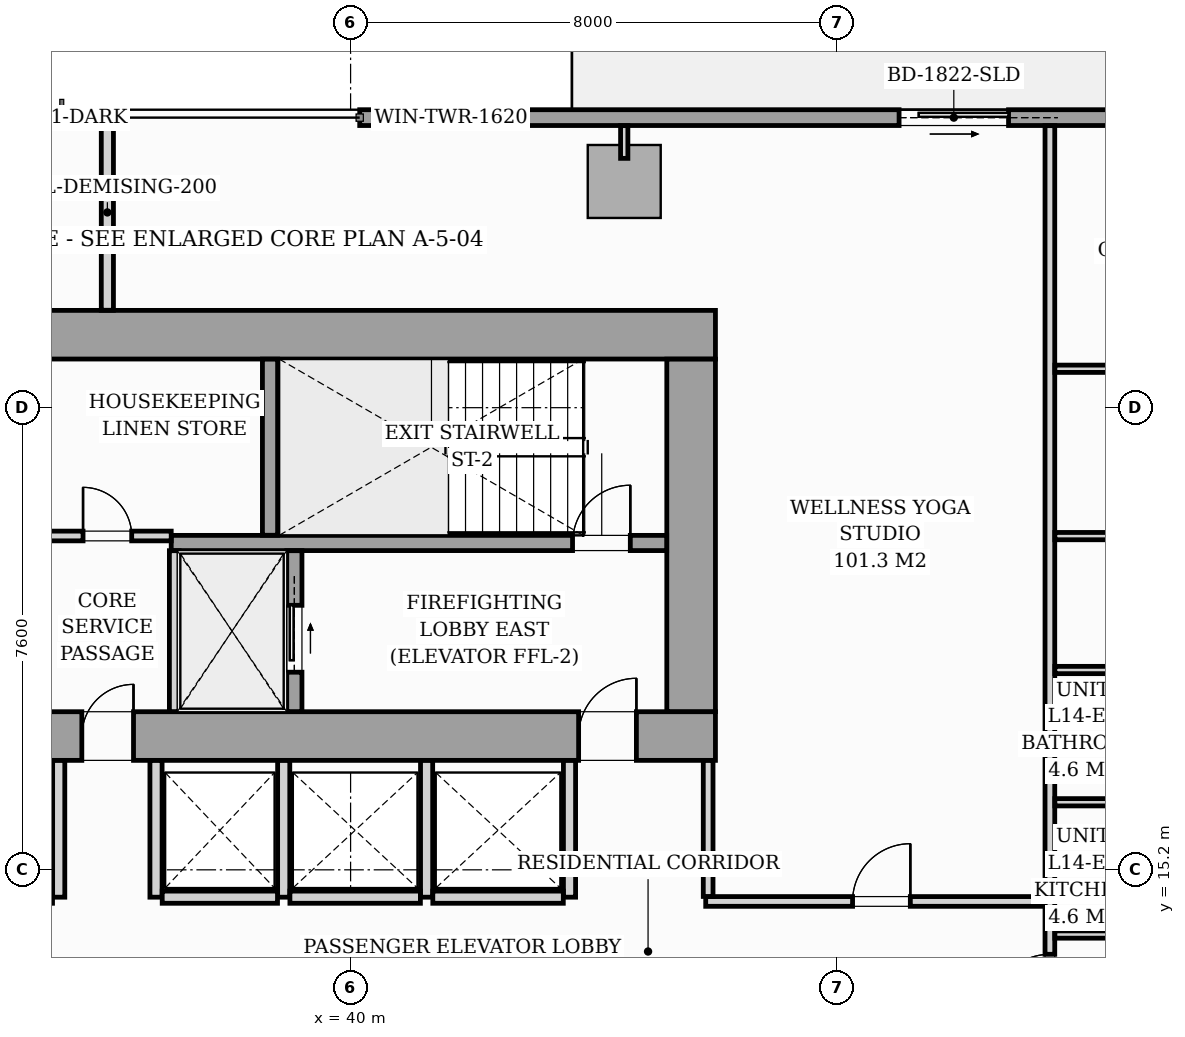
"""IFC4 building model, lengths in metres.
Left out: names, types, materials, properties, quantities, classifications, styles, units other than length and angle.
Written with IfcOpenShell. Run it as: python <this file> out.ifc"""

import sys

from ifc_helpers import new_model, si_unit, direction, frame, frame_2d, origin, origin_2d, place, context, subcontext, project, spatial, rectangle, i_section, extrude, source, transform, mapped, element, fill, save


model = new_model("IFC4")
c1 = context("Model", 3, precision=1e-05, world=origin(), true_north=direction((0.0, 1.0)))
c2 = subcontext(c1, "Body", "Model", "MODEL_VIEW")
j1 = project(units=[si_unit("LENGTHUNIT", "METRE"), si_unit("PLANEANGLEUNIT", "RADIAN")], contexts=[c1])
p1 = place(None, origin())
s1 = spatial("IfcSite", under=j1, at=p1, CompositionType="ELEMENT")
p2 = place(p1, origin())
s2 = spatial("IfcBuilding", under=s1, at=p2, CompositionType="ELEMENT")
p3 = place(p2, frame((0.0, 0.0, 51.8)))
s3 = spatial("IfcBuildingStorey", under=s2, at=p3, CompositionType="ELEMENT", Elevation=51.8)
m1 = source(origin(), c2, "Body", "SweptSolid", [
    extrude(i_section(OverallWidth=0.437, OverallDepth=0.514, WebThickness=0.061, FlangeThickness=0.097, FilletRadius=0.018, at=origin_2d()), origin(), (0.0, 0.0, 1.0), 3.196),
])
for number, where, z_axis, x_axis in (
    (1, (38.88, 17.4, 0.002), (0.0, 0.0, 1.0), (1.0, 0.0, 0.0)),
    (2, (45.6, 17.4, 0.002), (0.0, 0.0, 1.0), (1.0, 0.0, 0.0)),
    (3, (38.88, 24.0, 0.002), (0.0, 0.0, 1.0), (1.0, 0.0, 0.0)),
    (4, (45.6, 24.0, 0.002), (0.0, 0.0, 1.0), (1.0, 0.0, 0.0)),
):
    element("IfcColumn", number, at=place(p3, frame(where, z_axis=z_axis, x_axis=x_axis)), inside=s3, PredefinedType="PILASTER", context=c2, shape_type="MappedRepresentation", body=[
        mapped(m1, transform((0.0, 0.0, 0.0), scale=1.0)),
    ])
m2 = source(origin(), c2, "Body", "SweptSolid", [
    extrude(rectangle(XDim=1.2, YDim=1.2, at=origin_2d()), origin(), (0.0, 0.0, 1.0), 3.196),
])
p4 = place(p3, frame((44.5, 26.52, 0.002), z_axis=(0.0, 0.0, 1.0), x_axis=(1.0, 0.0, 0.0)))
e5 = element("IfcColumn", 5, at=p4, inside=s3, PredefinedType="COLUMN", context=c2, shape_type="MappedRepresentation", body=[
    mapped(m2, transform((0.0, 0.0, 0.0), scale=1.0)),
])
p5 = place(p3, frame((40.15, 27.57, 0.0), z_axis=(0.0, 0.0, 1.0), x_axis=(1.0, 0.0, 0.0)))
e6 = element("IfcWall", 6, at=p5, inside=s3, PredefinedType="STANDARD", context=c2, shape_type="SweptSolid", body=[
    extrude(rectangle(XDim=17.15, YDim=0.26, at=frame_2d((8.575, 0.0))), origin(), (0.0, 0.0, 1.0), 2.94),
])
p6 = place(p5, frame((8.87, 0.0, 0.0)))
e7 = element("IfcOpeningElement", 7, at=p6, cuts=e6, PredefinedType="OPENING", context=c2, shape_type="SweptSolid", body=[
    extrude(rectangle(XDim=1.8, YDim=2.06, at=frame_2d((0.9, 1.03))), frame((0.0, 0.14, 0.0), z_axis=(0.0, -1.0, 0.0), x_axis=(1.0, 0.0, 0.0)), (0.0, 0.0, 1.0), 0.28),
])
p7 = place(p5, frame((0.7, 0.0, 0.65)))
e8 = element("IfcOpeningElement", 8, at=p7, cuts=e6, PredefinedType="OPENING", context=c2, shape_type="SweptSolid", body=[
    extrude(rectangle(XDim=1.6, YDim=1.5, at=frame_2d((0.8, 0.75))), frame((0.0, 0.14, 0.0), z_axis=(0.0, -1.0, 0.0), x_axis=(1.0, 0.0, 0.0)), (0.0, 0.0, 1.0), 0.28),
])
p8 = place(p3, frame((26.0, 17.4, 0.0), z_axis=(0.0, 0.0, 1.0), x_axis=(1.0, 0.0, 0.0)))
e9 = element("IfcWall", 9, at=p8, inside=s3, PredefinedType="SHEAR", context=c2, shape_type="SweptSolid", body=[
    extrude(rectangle(XDim=20.0, YDim=0.8, at=frame_2d((10.0, 0.0))), origin(), (0.0, 0.0, 1.0), 3.2),
])
p9 = place(p8, frame((1.15, 0.0, 0.0)))
e10 = element("IfcOpeningElement", 10, at=p9, cuts=e9, PredefinedType="OPENING", context=c2, shape_type="SweptSolid", body=[
    extrude(rectangle(XDim=0.95, YDim=2.06, at=frame_2d((0.475, 1.03))), frame((0.0, 0.41, 0.0), z_axis=(0.0, -1.0, 0.0), x_axis=(1.0, 0.0, 0.0)), (0.0, 0.0, 1.0), 0.82),
])
p10 = place(p8, frame((9.58, 0.0, 0.0)))
e11 = element("IfcOpeningElement", 11, at=p10, cuts=e9, PredefinedType="OPENING", context=c2, shape_type="SweptSolid", body=[
    extrude(rectangle(XDim=0.85, YDim=2.0, at=frame_2d((0.425, 1.0))), frame((0.0, 0.41, 0.0), z_axis=(0.0, -1.0, 0.0), x_axis=(1.0, 0.0, 0.0)), (0.0, 0.0, 1.0), 0.82),
])
p11 = place(p8, frame((17.75, 0.0, 0.0)))
e12 = element("IfcOpeningElement", 12, at=p11, cuts=e9, PredefinedType="OPENING", context=c2, shape_type="SweptSolid", body=[
    extrude(rectangle(XDim=0.95, YDim=2.06, at=frame_2d((0.475, 1.03))), frame((0.0, 0.41, 0.0), z_axis=(0.0, -1.0, 0.0), x_axis=(1.0, 0.0, 0.0)), (0.0, 0.0, 1.0), 0.82),
])
p12 = place(p3, frame((26.0, 24.0, 0.0), z_axis=(0.0, 0.0, 1.0), x_axis=(1.0, 0.0, 0.0)))
e13 = element("IfcWall", 13, at=p12, inside=s3, PredefinedType="SHEAR", context=c2, shape_type="SweptSolid", body=[
    extrude(rectangle(XDim=20.0, YDim=0.8, at=frame_2d((10.0, 0.0))), origin(), (0.0, 0.0, 1.0), 3.2),
])
p13 = place(p3, frame((45.6, 17.802, 0.0), z_axis=(0.0, 0.0, 1.0), x_axis=(0.0, 1.0, 0.0)))
e14 = element("IfcWall", 14, at=p13, inside=s3, PredefinedType="SHEAR", context=c2, shape_type="SweptSolid", body=[
    extrude(rectangle(XDim=5.796, YDim=0.8, at=frame_2d((2.898, 0.0))), origin(), (0.0, 0.0, 1.0), 3.2),
])
p14 = place(p3, frame((37.05, 20.575, 0.0), z_axis=(0.0, 0.0, 1.0), x_axis=(1.0, 0.0, 0.0)))
e15 = element("IfcWall", 15, at=p14, inside=s3, PredefinedType="SOLIDWALL", context=c2, shape_type="SweptSolid", body=[
    extrude(rectangle(XDim=8.148, YDim=0.25, at=frame_2d((4.074, 0.0))), origin(), (0.0, 0.0, 1.0), 3.2),
])
p15 = place(p14, frame((6.6, 0.0, 0.0)))
e16 = element("IfcOpeningElement", 16, at=p15, cuts=e15, PredefinedType="OPENING", context=c2, shape_type="SweptSolid", body=[
    extrude(rectangle(XDim=0.95, YDim=2.06, at=frame_2d((0.475, 1.03))), frame((0.0, 0.135, 0.0), z_axis=(0.0, -1.0, 0.0), x_axis=(1.0, 0.0, 0.0)), (0.0, 0.0, 1.0), 0.27),
])
p16 = place(p3, frame((38.675, 20.702, 0.0), z_axis=(0.0, 0.0, 1.0), x_axis=(0.0, 1.0, 0.0)))
e17 = element("IfcWall", 17, at=p16, inside=s3, PredefinedType="SOLIDWALL", context=c2, shape_type="SweptSolid", body=[
    extrude(rectangle(XDim=2.896, YDim=0.25, at=frame_2d((1.448, 0.0))), origin(), (0.0, 0.0, 1.0), 3.2),
])
p17 = place(p3, frame((37.1, 17.802, 0.0), z_axis=(0.0, 0.0, 1.0), x_axis=(0.0, 1.0, 0.0)))
e18 = element("IfcWall", 18, at=p17, inside=s3, PredefinedType="PARTITIONING", context=c2, shape_type="SweptSolid", body=[
    extrude(rectangle(XDim=2.646, YDim=0.16, at=frame_2d((1.323, 0.0))), origin(), (0.0, 0.0, 1.0), 2.94),
])
p18 = place(p3, frame((39.075, 17.802, 0.0), z_axis=(0.0, 0.0, 1.0), x_axis=(0.0, 1.0, 0.0)))
e19 = element("IfcWall", 19, at=p18, inside=s3, PredefinedType="SOLIDWALL", context=c2, shape_type="SweptSolid", body=[
    extrude(rectangle(XDim=2.646, YDim=0.25, at=frame_2d((1.323, 0.0))), origin(), (0.0, 0.0, 1.0), 3.2),
])
p19 = place(p18, frame((0.648, 0.0, 0.0)))
e20 = element("IfcOpeningElement", 20, at=p19, cuts=e19, PredefinedType="OPENING", context=c2, shape_type="SweptSolid", body=[
    extrude(rectangle(XDim=1.1, YDim=2.08, at=frame_2d((0.55, 1.04))), frame((0.0, 0.135, 0.0), z_axis=(0.0, -1.0, 0.0), x_axis=(1.0, 0.0, 0.0)), (0.0, 0.0, 1.0), 0.27),
])
p20 = place(p3, frame((34.95, 20.69, 0.0), z_axis=(0.0, 0.0, 1.0), x_axis=(1.0, 0.0, 0.0)))
e21 = element("IfcWall", 21, at=p20, inside=s3, PredefinedType="PARTITIONING", context=c2, shape_type="SweptSolid", body=[
    extrude(rectangle(XDim=2.1, YDim=0.16, at=frame_2d((1.05, 0.0))), origin(), (0.0, 0.0, 1.0), 2.94),
])
p21 = place(p20, frame((0.65, 0.0, 0.0)))
e22 = element("IfcOpeningElement", 22, at=p21, cuts=e21, PredefinedType="OPENING", context=c2, shape_type="SweptSolid", body=[
    extrude(rectangle(XDim=0.8, YDim=2.05, at=frame_2d((0.4, 1.025))), frame((0.0, 0.09, 0.0), z_axis=(0.0, -1.0, 0.0), x_axis=(1.0, 0.0, 0.0)), (0.0, 0.0, 1.0), 0.18),
])
for number, where, z_axis, x_axis in (
    (23, (35.2, 14.75, 0.0), (0.0, 0.0, 1.0), (0.0, 1.0, 0.0)),
    (24, (36.8, 14.75, 0.0), (0.0, 0.0, 1.0), (0.0, 1.0, 0.0)),
    (25, (38.9, 14.75, 0.0), (0.0, 0.0, 1.0), (0.0, 1.0, 0.0)),
):
    element("IfcWall", number, at=place(p3, frame(where, z_axis=z_axis, x_axis=x_axis)), inside=s3, PredefinedType="PARTITIONING", context=c2, shape_type="SweptSolid", body=[
        extrude(rectangle(XDim=2.248, YDim=0.2, at=frame_2d((1.124, 0.0))), origin(), (0.0, 0.0, 1.0), 2.94),
    ])
p22 = place(p3, frame((36.902, 14.75, 0.0), z_axis=(0.0, 0.0, 1.0), x_axis=(1.0, 0.0, 0.0)))
e26 = element("IfcWall", 26, at=p22, inside=s3, PredefinedType="PARTITIONING", context=c2, shape_type="SweptSolid", body=[
    extrude(rectangle(XDim=1.896, YDim=0.2, at=frame_2d((0.948, 0.0))), origin(), (0.0, 0.0, 1.0), 2.94),
])
for number, where, z_axis, x_axis in (
    (27, (41.25, 14.75, 0.0), (0.0, 0.0, 1.0), (0.0, 1.0, 0.0)),
    (28, (43.6, 14.75, 0.0), (0.0, 0.0, 1.0), (0.0, 1.0, 0.0)),
):
    element("IfcWall", number, at=place(p3, frame(where, z_axis=z_axis, x_axis=x_axis)), inside=s3, PredefinedType="PARTITIONING", context=c2, shape_type="SweptSolid", body=[
        extrude(rectangle(XDim=2.248, YDim=0.2, at=frame_2d((1.124, 0.0))), origin(), (0.0, 0.0, 1.0), 2.94),
    ])
for number, where, z_axis, x_axis in (
    (29, (39.002, 14.75, 0.0), (0.0, 0.0, 1.0), (1.0, 0.0, 0.0)),
    (30, (41.352, 14.75, 0.0), (0.0, 0.0, 1.0), (1.0, 0.0, 0.0)),
):
    element("IfcWall", number, at=place(p3, frame(where, z_axis=z_axis, x_axis=x_axis)), inside=s3, PredefinedType="PARTITIONING", context=c2, shape_type="SweptSolid", body=[
        extrude(rectangle(XDim=2.146, YDim=0.2, at=frame_2d((1.073, 0.0))), origin(), (0.0, 0.0, 1.0), 2.94),
    ])
p23 = place(p3, frame((51.5, 12.432, 0.0), z_axis=(0.0, 0.0, 1.0), x_axis=(0.0, 1.0, 0.0)))
e31 = element("IfcWall", 31, at=p23, inside=s3, PredefinedType="PARTITIONING", context=c2, shape_type="SweptSolid", body=[
    extrude(rectangle(XDim=15.006, YDim=0.16, at=frame_2d((7.503, 0.0))), origin(), (0.0, 0.0, 1.0), 2.94),
])
p24 = place(p23, frame((0.429, 0.0, 0.0)))
e32 = element("IfcOpeningElement", 32, at=p24, cuts=e31, PredefinedType="OPENING", context=c2, shape_type="SweptSolid", body=[
    extrude(rectangle(XDim=0.95, YDim=2.06, at=frame_2d((0.475, 1.03))), frame((0.0, 0.09, 0.0), z_axis=(0.0, -1.0, 0.0), x_axis=(1.0, 0.0, 0.0)), (0.0, 0.0, 1.0), 0.18),
])
p25 = place(p3, frame((36.0, 24.402, 0.0), z_axis=(0.0, 0.0, 1.0), x_axis=(0.0, 1.0, 0.0)))
e33 = element("IfcWall", 33, at=p25, inside=s3, PredefinedType="PARTITIONING", context=c2, shape_type="SweptSolid", body=[
    extrude(rectangle(XDim=3.218, YDim=0.2, at=frame_2d((1.609, 0.0))), origin(), (0.0, 0.0, 1.0), 2.94),
])
p26 = place(p3, frame((51.582, 16.311, 0.0), z_axis=(0.0, 0.0, 1.0), x_axis=(1.0, 0.0, 0.0)))
e34 = element("IfcWall", 34, at=p26, inside=s3, PredefinedType="PARTITIONING", context=c2, shape_type="SweptSolid", body=[
    extrude(rectangle(XDim=2.256, YDim=0.12, at=frame_2d((1.128, 0.0))), origin(), (0.0, 0.0, 1.0), 2.045),
])
for number, where, z_axis, x_axis in (
    (35, (51.582, 14.136, 0.0), (0.0, 0.0, 1.0), (1.0, 0.0, 0.0)),
    (36, (51.582, 18.486, 0.0), (0.0, 0.0, 1.0), (1.0, 0.0, 0.0)),
):
    element("IfcWall", number, at=place(p3, frame(where, z_axis=z_axis, x_axis=x_axis)), inside=s3, PredefinedType="PARTITIONING", context=c2, shape_type="SweptSolid", body=[
        extrude(rectangle(XDim=2.256, YDim=0.12, at=frame_2d((1.128, 0.0))), origin(), (0.0, 0.0, 1.0), 2.94),
    ])
p27 = place(p3, frame((51.582, 23.44, 0.0), z_axis=(0.0, 0.0, 1.0), x_axis=(1.0, 0.0, 0.0)))
e37 = element("IfcWall", 37, at=p27, inside=s3, PredefinedType="PARTITIONING", context=c2, shape_type="SweptSolid", body=[
    extrude(rectangle(XDim=8.138, YDim=0.12, at=frame_2d((4.069, 0.0))), origin(), (0.0, 0.0, 1.0), 2.94),
])
p28 = place(p27, frame((3.653, 0.0, 0.0)))
e38 = element("IfcOpeningElement", 38, at=p28, cuts=e37, PredefinedType="OPENING", context=c2, shape_type="SweptSolid", body=[
    extrude(rectangle(XDim=0.85, YDim=2.05, at=frame_2d((0.425, 1.025))), frame((0.0, 0.07, 0.0), z_axis=(0.0, -1.0, 0.0), x_axis=(1.0, 0.0, 0.0)), (0.0, 0.0, 1.0), 0.14),
])
p29 = place(p3, frame((51.582, 20.688, 0.0), z_axis=(0.0, 0.0, 1.0), x_axis=(1.0, 0.0, 0.0)))
e39 = element("IfcWall", 39, at=p29, inside=s3, PredefinedType="PARTITIONING", context=c2, shape_type="SweptSolid", body=[
    extrude(rectangle(XDim=8.138, YDim=0.12, at=frame_2d((4.069, 0.0))), origin(), (0.0, 0.0, 1.0), 2.94),
])
p30 = place(p29, frame((3.653, 0.0, 0.0)))
e40 = element("IfcOpeningElement", 40, at=p30, cuts=e39, PredefinedType="OPENING", context=c2, shape_type="SweptSolid", body=[
    extrude(rectangle(XDim=0.85, YDim=2.05, at=frame_2d((0.425, 1.025))), frame((0.0, 0.07, 0.0), z_axis=(0.0, -1.0, 0.0), x_axis=(1.0, 0.0, 0.0)), (0.0, 0.0, 1.0), 0.14),
])
p31 = place(p3, frame((45.84, 14.68, 0.0), z_axis=(0.0, 0.0, 1.0), x_axis=(1.0, 0.0, 0.0)))
e41 = element("IfcWall", 41, at=p31, inside=s3, PredefinedType="PARTITIONING", context=c2, shape_type="SweptSolid", body=[
    extrude(rectangle(XDim=5.578, YDim=0.16, at=frame_2d((2.789, 0.0))), origin(), (0.0, 0.0, 1.0), 2.94),
])
p32 = place(p31, frame((2.415, 0.0, 0.0)))
e42 = element("IfcOpeningElement", 42, at=p32, cuts=e41, PredefinedType="OPENING", context=c2, shape_type="SweptSolid", body=[
    extrude(rectangle(XDim=0.95, YDim=2.06, at=frame_2d((0.475, 1.03))), frame((0.0, 0.09, 0.0), z_axis=(0.0, -1.0, 0.0), x_axis=(1.0, 0.0, 0.0)), (0.0, 0.0, 1.0), 0.18),
])
p33 = place(p3, frame((45.88, 14.762, 0.0), z_axis=(0.0, 0.0, 1.0), x_axis=(0.0, 1.0, 0.0)))
e43 = element("IfcWall", 43, at=p33, inside=s3, PredefinedType="PARTITIONING", context=c2, shape_type="SweptSolid", body=[
    extrude(rectangle(XDim=2.236, YDim=0.16, at=frame_2d((1.118, 0.0))), origin(), (0.0, 0.0, 1.0), 2.94),
])
p34 = place(p3, frame((44.5, 26.9, 0.0), z_axis=(0.0, 0.0, 1.0), x_axis=(0.0, 1.0, 0.0)))
e44 = element("IfcWall", 44, at=p34, inside=s3, PredefinedType="PARTITIONING", context=c2, shape_type="SweptSolid", body=[
    extrude(rectangle(XDim=0.538, YDim=0.12, at=frame_2d((0.269, 0.0))), origin(), (0.0, 0.0, 1.0), 2.94),
])
m3 = source(origin(), c2, "Body", "SweptSolid", [
    extrude(rectangle(XDim=1.8, YDim=2.06, at=frame_2d((0.9, 1.03))), frame((0.0, 0.025, 0.0), z_axis=(0.0, -1.0, 0.0), x_axis=(1.0, 0.0, 0.0)), (0.0, 0.0, 1.0), 0.05),
])
p35 = place(p6, origin())
e45 = element("IfcDoor", 45, at=p35, inside=s3, OperationType="SLIDING_TO_RIGHT", PredefinedType="DOOR", context=c2, shape_type="MappedRepresentation", body=[
    mapped(m3, transform((0.0, 0.0, 0.0), scale=1.0)),
])
fill(e7, e45)
m4 = source(origin(), c2, "Body", "SweptSolid", [
    extrude(rectangle(XDim=1.6, YDim=1.5, at=frame_2d((0.8, 0.75))), frame((0.0, 0.03, 0.0), z_axis=(0.0, -1.0, 0.0), x_axis=(1.0, 0.0, 0.0)), (0.0, 0.0, 1.0), 0.06),
])
p36 = place(p7, origin())
e46 = element("IfcWindow", 46, at=p36, inside=s3, PartitioningType="SINGLE_PANEL", PredefinedType="WINDOW", context=c2, shape_type="MappedRepresentation", body=[
    mapped(m4, transform((0.0, 0.0, 0.0), scale=1.0)),
])
fill(e8, e46)
m5 = source(origin(), c2, "Body", "SweptSolid", [
    extrude(rectangle(XDim=0.85, YDim=2.0, at=frame_2d((0.425, 1.0))), frame((0.0, 0.025, 0.0), z_axis=(0.0, -1.0, 0.0), x_axis=(1.0, 0.0, 0.0)), (0.0, 0.0, 1.0), 0.05),
])
p37 = place(p10, origin())
e47 = element("IfcDoor", 47, at=p37, inside=s3, OperationType="SINGLE_SWING_RIGHT", PredefinedType="DOOR", context=c2, shape_type="MappedRepresentation", body=[
    mapped(m5, transform((0.0, 0.0, 0.0), scale=1.0)),
])
fill(e11, e47)
m6 = source(origin(), c2, "Body", "SweptSolid", [
    extrude(rectangle(XDim=0.95, YDim=2.06, at=frame_2d((0.475, 1.03))), frame((0.0, 0.025, 0.0), z_axis=(0.0, -1.0, 0.0), x_axis=(1.0, 0.0, 0.0)), (0.0, 0.0, 1.0), 0.05),
])
p38 = place(p11, origin())
e48 = element("IfcDoor", 48, at=p38, inside=s3, OperationType="SINGLE_SWING_RIGHT", PredefinedType="DOOR", context=c2, shape_type="MappedRepresentation", body=[
    mapped(m6, transform((0.0, 0.0, 0.0), scale=1.0)),
])
fill(e12, e48)
p39 = place(p15, origin())
e49 = element("IfcDoor", 49, at=p39, inside=s3, OperationType="SINGLE_SWING_RIGHT", PredefinedType="DOOR", context=c2, shape_type="MappedRepresentation", body=[
    mapped(m6, transform((0.0, 0.0, 0.0), scale=1.0)),
])
fill(e16, e49)
m7 = source(origin(), c2, "Body", "SweptSolid", [
    extrude(rectangle(XDim=1.1, YDim=2.08, at=frame_2d((0.55, 1.04))), frame((0.0, 0.025, 0.0), z_axis=(0.0, -1.0, 0.0), x_axis=(1.0, 0.0, 0.0)), (0.0, 0.0, 1.0), 0.05),
])
p40 = place(p19, origin())
e50 = element("IfcDoor", 50, at=p40, inside=s3, OperationType="SLIDING_TO_RIGHT", PredefinedType="DOOR", context=c2, shape_type="MappedRepresentation", body=[
    mapped(m7, transform((0.0, 0.0, 0.0), scale=1.0)),
])
fill(e20, e50)
m8 = source(origin(), c2, "Body", "SweptSolid", [
    extrude(rectangle(XDim=0.8, YDim=2.05, at=frame_2d((0.4, 1.025))), frame((0.0, 0.025, 0.0), z_axis=(0.0, -1.0, 0.0), x_axis=(1.0, 0.0, 0.0)), (0.0, 0.0, 1.0), 0.05),
])
p41 = place(p21, origin())
e51 = element("IfcDoor", 51, at=p41, inside=s3, OperationType="SINGLE_SWING_LEFT", PredefinedType="DOOR", context=c2, shape_type="MappedRepresentation", body=[
    mapped(m8, transform((0.0, 0.0, 0.0), scale=1.0)),
])
fill(e22, e51)
m9 = source(origin(), c2, "Body", "SweptSolid", [
    extrude(rectangle(XDim=0.95, YDim=2.06, at=frame_2d((0.475, 1.03))), frame((0.0, 0.025, 0.0), z_axis=(0.0, -1.0, 0.0), x_axis=(1.0, 0.0, 0.0)), (0.0, 0.0, 1.0), 0.05),
])
p42 = place(p24, origin())
e52 = element("IfcDoor", 52, at=p42, inside=s3, OperationType="SINGLE_SWING_LEFT", PredefinedType="DOOR", context=c2, shape_type="MappedRepresentation", body=[
    mapped(m9, transform((0.0, 0.0, 0.0), scale=1.0)),
])
fill(e32, e52)
p43 = place(p32, origin())
e53 = element("IfcDoor", 53, at=p43, inside=s3, OperationType="SINGLE_SWING_RIGHT", PredefinedType="DOOR", context=c2, shape_type="MappedRepresentation", body=[
    mapped(m9, transform((0.0, 0.0, 0.0), scale=1.0)),
])
fill(e42, e53)
save(model, sys.argv[1])
